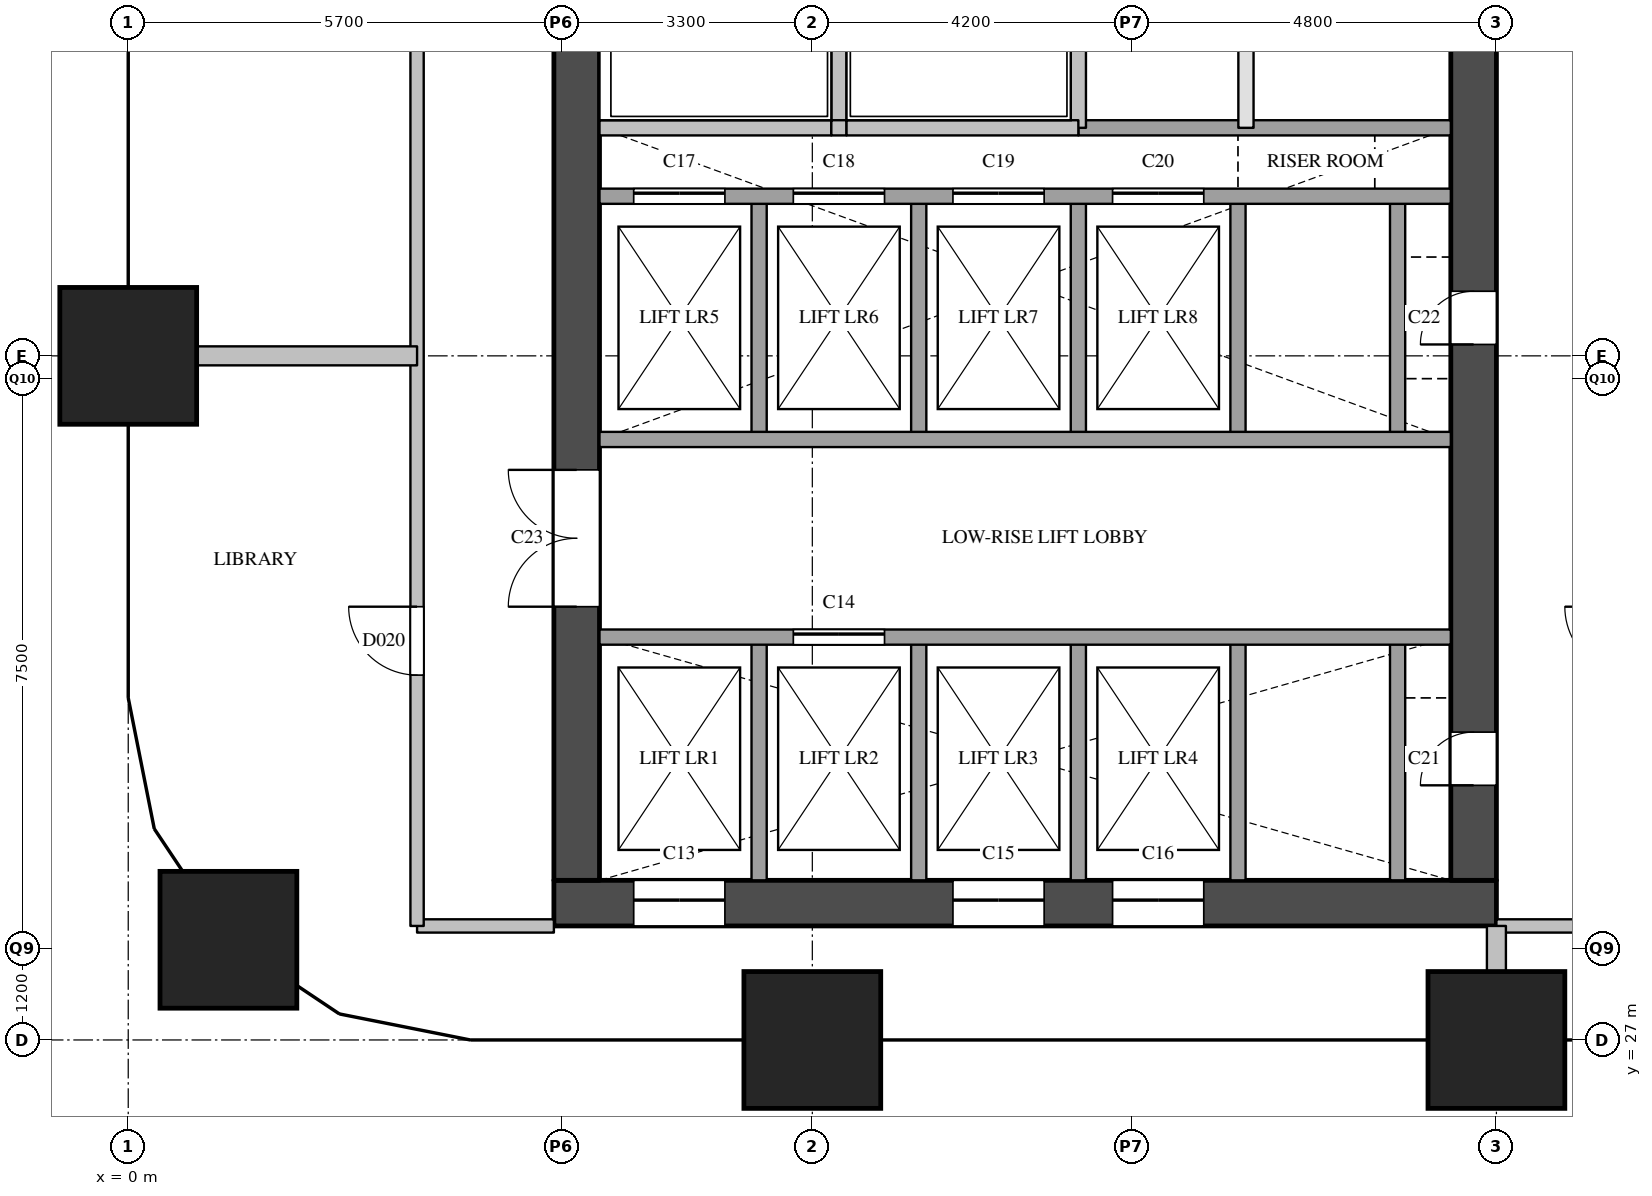
"""IFC4 building model, lengths in metres.
Left out: names, types, materials, properties, quantities, classifications, styles, units other than length and angle.
Written with IfcOpenShell. Run it as: python <this file> out.ifc"""

import sys

from ifc_helpers import new_model, si_unit, direction, frame, frame_2d, origin, origin_2d, place, context, subcontext, project, spatial, rectangle, extrude, element, fill, save


model = new_model("IFC4")
c1 = context("Model", 3, precision=1e-05, world=origin(), true_north=direction((0.0, 1.0)))
c2 = subcontext(c1, "Body", "Model", "MODEL_VIEW")
j1 = project(units=[si_unit("LENGTHUNIT", "METRE"), si_unit("PLANEANGLEUNIT", "RADIAN")], contexts=[c1])
p1 = place(None, origin())
s1 = spatial("IfcSite", under=j1, at=p1, CompositionType="ELEMENT")
p2 = place(p1, origin())
s2 = spatial("IfcBuilding", under=s1, at=p2, CompositionType="ELEMENT")
p3 = place(p2, frame((0.0, 0.0, 96.8)))
s3 = spatial("IfcBuildingStorey", under=s2, at=p3, CompositionType="ELEMENT", Elevation=96.8)
for number, where, z_axis, x_axis in (
    (1, (1.318, 28.318, 0.0), (0.0, 0.0, 1.0), (1.0, 0.0, 0.0)),
    (2, (0.0, 36.0, 0.0), (0.0, 0.0, 1.0), (1.0, 0.0, 0.0)),
    (3, (9.0, 27.0, 0.0), (0.0, 0.0, 1.0), (1.0, 0.0, 0.0)),
    (4, (18.0, 27.0, 0.0), (0.0, 0.0, 1.0), (1.0, 0.0, 0.0)),
):
    element("IfcColumn", number, at=place(p3, frame(where, z_axis=z_axis, x_axis=x_axis)), inside=s3, PredefinedType="COLUMN", context=c2, shape_type="SweptSolid", body=[
        extrude(rectangle(XDim=1.8, YDim=1.8, at=origin_2d()), origin(), (0.0, 0.0, 1.0), 3.8),
    ])
p4 = place(p3, frame((5.6, 28.8, 0.0), z_axis=(0.0, 0.0, 1.0), x_axis=(1.0, 0.0, 0.0)))
e5 = element("IfcWall", 5, at=p4, inside=s3, PredefinedType="SHEAR", context=c2, shape_type="SweptSolid", body=[
    extrude(rectangle(XDim=12.4, YDim=0.6, at=frame_2d((6.2, 0.0))), origin(), (0.0, 0.0, 1.0), 3.5),
])
p5 = place(p4, frame((1.05, 0.0, 0.0)))
e6 = element("IfcOpeningElement", 6, at=p5, cuts=e5, PredefinedType="OPENING", context=c2, shape_type="SweptSolid", body=[
    extrude(rectangle(XDim=1.2, YDim=2.1, at=frame_2d((0.6, 1.05))), frame((0.0, 0.31, 0.0), z_axis=(0.0, -1.0, 0.0), x_axis=(1.0, 0.0, 0.0)), (0.0, 0.0, 1.0), 0.62),
])
p6 = place(p4, frame((5.25, 0.0, 0.0)))
e7 = element("IfcOpeningElement", 7, at=p6, cuts=e5, PredefinedType="OPENING", context=c2, shape_type="SweptSolid", body=[
    extrude(rectangle(XDim=1.2, YDim=2.1, at=frame_2d((0.6, 1.05))), frame((0.0, 0.31, 0.0), z_axis=(0.0, -1.0, 0.0), x_axis=(1.0, 0.0, 0.0)), (0.0, 0.0, 1.0), 0.62),
])
p7 = place(p4, frame((7.35, 0.0, 0.0)))
e8 = element("IfcOpeningElement", 8, at=p7, cuts=e5, PredefinedType="OPENING", context=c2, shape_type="SweptSolid", body=[
    extrude(rectangle(XDim=1.2, YDim=2.1, at=frame_2d((0.6, 1.05))), frame((0.0, 0.31, 0.0), z_axis=(0.0, -1.0, 0.0), x_axis=(1.0, 0.0, 0.0)), (0.0, 0.0, 1.0), 0.62),
])
p8 = place(p3, frame((5.9, 29.1, 0.0), z_axis=(0.0, 0.0, 1.0), x_axis=(0.0, 1.0, 0.0)))
e9 = element("IfcWall", 9, at=p8, inside=s3, PredefinedType="SHEAR", context=c2, shape_type="SweptSolid", body=[
    extrude(rectangle(XDim=20.3, YDim=0.6, at=frame_2d((10.15, 0.0))), origin(), (0.0, 0.0, 1.0), 3.5),
])
p9 = place(p8, frame((3.6, 0.0, 0.0)))
e10 = element("IfcOpeningElement", 10, at=p9, cuts=e9, PredefinedType="OPENING", context=c2, shape_type="SweptSolid", body=[
    extrude(rectangle(XDim=1.8, YDim=2.1, at=frame_2d((0.9, 1.05))), frame((0.0, 0.31, 0.0), z_axis=(0.0, -1.0, 0.0), x_axis=(1.0, 0.0, 0.0)), (0.0, 0.0, 1.0), 0.62),
])
p10 = place(p8, frame((16.4, 0.0, 0.0)))
e11 = element("IfcOpeningElement", 11, at=p10, cuts=e9, PredefinedType="OPENING", context=c2, shape_type="SweptSolid", body=[
    extrude(rectangle(XDim=1.0, YDim=2.1, at=frame_2d((0.5, 1.05))), frame((0.0, 0.31, 0.0), z_axis=(0.0, -1.0, 0.0), x_axis=(1.0, 0.0, 0.0)), (0.0, 0.0, 1.0), 0.62),
])
p11 = place(p3, frame((17.7, 29.1, 0.0), z_axis=(0.0, 0.0, 1.0), x_axis=(0.0, 1.0, 0.0)))
e12 = element("IfcWall", 12, at=p11, inside=s3, PredefinedType="SHEAR", context=c2, shape_type="SweptSolid", body=[
    extrude(rectangle(XDim=20.3, YDim=0.6, at=frame_2d((10.15, 0.0))), origin(), (0.0, 0.0, 1.0), 3.5),
])
p12 = place(p11, frame((1.25, 0.0, 0.0)))
e13 = element("IfcOpeningElement", 13, at=p12, cuts=e12, PredefinedType="OPENING", context=c2, shape_type="SweptSolid", body=[
    extrude(rectangle(XDim=0.7, YDim=2.1, at=frame_2d((0.35, 1.05))), frame((0.0, 0.31, 0.0), z_axis=(0.0, -1.0, 0.0), x_axis=(1.0, 0.0, 0.0)), (0.0, 0.0, 1.0), 0.62),
])
p13 = place(p11, frame((7.05, 0.0, 0.0)))
e14 = element("IfcOpeningElement", 14, at=p13, cuts=e12, PredefinedType="OPENING", context=c2, shape_type="SweptSolid", body=[
    extrude(rectangle(XDim=0.7, YDim=2.1, at=frame_2d((0.35, 1.05))), frame((0.0, 0.31, 0.0), z_axis=(0.0, -1.0, 0.0), x_axis=(1.0, 0.0, 0.0)), (0.0, 0.0, 1.0), 0.62),
])
p14 = place(p3, frame((8.3, 29.1, 0.0), z_axis=(0.0, 0.0, 1.0), x_axis=(0.0, 1.0, 0.0)))
e15 = element("IfcWall", 15, at=p14, inside=s3, PredefinedType="SOLIDWALL", context=c2, shape_type="SweptSolid", body=[
    extrude(rectangle(XDim=3.2, YDim=0.2, at=frame_2d((1.6, 0.0))), origin(), (0.0, 0.0, 1.0), 3.5),
])
p15 = place(p3, frame((8.3, 34.9, 0.0), z_axis=(0.0, 0.0, 1.0), x_axis=(0.0, 1.0, 0.0)))
e16 = element("IfcWall", 16, at=p15, inside=s3, PredefinedType="SOLIDWALL", context=c2, shape_type="SweptSolid", body=[
    extrude(rectangle(XDim=3.2, YDim=0.2, at=frame_2d((1.6, 0.0))), origin(), (0.0, 0.0, 1.0), 3.5),
])
p16 = place(p3, frame((9.35, 39.0, 0.0), z_axis=(0.0, 0.0, 1.0), x_axis=(0.0, 1.0, 0.0)))
e17 = element("IfcWall", 17, at=p16, inside=s3, PredefinedType="SOLIDWALL", context=c2, shape_type="SweptSolid", body=[
    extrude(rectangle(XDim=1.9, YDim=0.2, at=frame_2d((0.95, 0.0))), origin(), (0.0, 0.0, 1.0), 3.5),
])
p17 = place(p3, frame((10.4, 29.1, 0.0), z_axis=(0.0, 0.0, 1.0), x_axis=(0.0, 1.0, 0.0)))
e18 = element("IfcWall", 18, at=p17, inside=s3, PredefinedType="SOLIDWALL", context=c2, shape_type="SweptSolid", body=[
    extrude(rectangle(XDim=3.2, YDim=0.2, at=frame_2d((1.6, 0.0))), origin(), (0.0, 0.0, 1.0), 3.5),
])
p18 = place(p3, frame((10.4, 34.9, 0.0), z_axis=(0.0, 0.0, 1.0), x_axis=(0.0, 1.0, 0.0)))
e19 = element("IfcWall", 19, at=p18, inside=s3, PredefinedType="SOLIDWALL", context=c2, shape_type="SweptSolid", body=[
    extrude(rectangle(XDim=3.2, YDim=0.2, at=frame_2d((1.6, 0.0))), origin(), (0.0, 0.0, 1.0), 3.5),
])
p19 = place(p3, frame((12.5, 29.1, 0.0), z_axis=(0.0, 0.0, 1.0), x_axis=(0.0, 1.0, 0.0)))
e20 = element("IfcWall", 20, at=p19, inside=s3, PredefinedType="SOLIDWALL", context=c2, shape_type="SweptSolid", body=[
    extrude(rectangle(XDim=3.2, YDim=0.2, at=frame_2d((1.6, 0.0))), origin(), (0.0, 0.0, 1.0), 3.5),
])
p20 = place(p3, frame((12.5, 34.9, 0.0), z_axis=(0.0, 0.0, 1.0), x_axis=(0.0, 1.0, 0.0)))
e21 = element("IfcWall", 21, at=p20, inside=s3, PredefinedType="SOLIDWALL", context=c2, shape_type="SweptSolid", body=[
    extrude(rectangle(XDim=3.2, YDim=0.2, at=frame_2d((1.6, 0.0))), origin(), (0.0, 0.0, 1.0), 3.5),
])
p21 = place(p3, frame((12.5, 39.0, 0.0), z_axis=(0.0, 0.0, 1.0), x_axis=(0.0, 1.0, 0.0)))
e22 = element("IfcWall", 22, at=p21, inside=s3, PredefinedType="SOLIDWALL", context=c2, shape_type="SweptSolid", body=[
    extrude(rectangle(XDim=1.9, YDim=0.2, at=frame_2d((0.95, 0.0))), origin(), (0.0, 0.0, 1.0), 3.5),
])
p22 = place(p3, frame((14.6, 29.1, 0.0), z_axis=(0.0, 0.0, 1.0), x_axis=(0.0, 1.0, 0.0)))
e23 = element("IfcWall", 23, at=p22, inside=s3, PredefinedType="SOLIDWALL", context=c2, shape_type="SweptSolid", body=[
    extrude(rectangle(XDim=3.2, YDim=0.2, at=frame_2d((1.6, 0.0))), origin(), (0.0, 0.0, 1.0), 3.5),
])
p23 = place(p3, frame((14.6, 34.9, 0.0), z_axis=(0.0, 0.0, 1.0), x_axis=(0.0, 1.0, 0.0)))
e24 = element("IfcWall", 24, at=p23, inside=s3, PredefinedType="SOLIDWALL", context=c2, shape_type="SweptSolid", body=[
    extrude(rectangle(XDim=3.2, YDim=0.2, at=frame_2d((1.6, 0.0))), origin(), (0.0, 0.0, 1.0), 3.5),
])
p24 = place(p3, frame((14.705, 39.0, 0.0), z_axis=(0.0, 0.0, 1.0), x_axis=(0.0, 1.0, 0.0)))
e25 = element("IfcWall", 25, at=p24, inside=s3, PredefinedType="PARTITIONING", context=c2, shape_type="SweptSolid", body=[
    extrude(rectangle(XDim=6.2, YDim=0.2, at=frame_2d((3.1, 0.0))), origin(), (0.0, 0.0, 1.0), 3.5),
])
p25 = place(p3, frame((16.7, 29.1, 0.0), z_axis=(0.0, 0.0, 1.0), x_axis=(0.0, 1.0, 0.0)))
e26 = element("IfcWall", 26, at=p25, inside=s3, PredefinedType="SOLIDWALL", context=c2, shape_type="SweptSolid", body=[
    extrude(rectangle(XDim=3.2, YDim=0.2, at=frame_2d((1.6, 0.0))), origin(), (0.0, 0.0, 1.0), 3.5),
])
p26 = place(p3, frame((16.7, 34.9, 0.0), z_axis=(0.0, 0.0, 1.0), x_axis=(0.0, 1.0, 0.0)))
e27 = element("IfcWall", 27, at=p26, inside=s3, PredefinedType="SOLIDWALL", context=c2, shape_type="SweptSolid", body=[
    extrude(rectangle(XDim=3.2, YDim=0.2, at=frame_2d((1.6, 0.0))), origin(), (0.0, 0.0, 1.0), 3.5),
])
p27 = place(p3, frame((6.2, 32.3, 0.0), z_axis=(0.0, 0.0, 1.0), x_axis=(1.0, 0.0, 0.0)))
e28 = element("IfcWall", 28, at=p27, inside=s3, PredefinedType="SOLIDWALL", context=c2, shape_type="SweptSolid", body=[
    extrude(rectangle(XDim=11.2, YDim=0.2, at=frame_2d((5.6, 0.0))), origin(), (0.0, 0.0, 1.0), 3.5),
])
p28 = place(p27, frame((2.55, 0.0, 0.0)))
e29 = element("IfcOpeningElement", 29, at=p28, cuts=e28, PredefinedType="OPENING", context=c2, shape_type="SweptSolid", body=[
    extrude(rectangle(XDim=1.2, YDim=2.1, at=frame_2d((0.6, 1.05))), frame((0.0, 0.11, 0.0), z_axis=(0.0, -1.0, 0.0), x_axis=(1.0, 0.0, 0.0)), (0.0, 0.0, 1.0), 0.22),
])
p29 = place(p3, frame((6.2, 34.9, 0.0), z_axis=(0.0, 0.0, 1.0), x_axis=(1.0, 0.0, 0.0)))
e30 = element("IfcWall", 30, at=p29, inside=s3, PredefinedType="SOLIDWALL", context=c2, shape_type="SweptSolid", body=[
    extrude(rectangle(XDim=11.2, YDim=0.2, at=frame_2d((5.6, 0.0))), origin(), (0.0, 0.0, 1.0), 3.5),
])
p30 = place(p3, frame((6.2, 38.1, 0.0), z_axis=(0.0, 0.0, 1.0), x_axis=(1.0, 0.0, 0.0)))
e31 = element("IfcWall", 31, at=p30, inside=s3, PredefinedType="SOLIDWALL", context=c2, shape_type="SweptSolid", body=[
    extrude(rectangle(XDim=11.2, YDim=0.2, at=frame_2d((5.6, 0.0))), origin(), (0.0, 0.0, 1.0), 3.5),
])
p31 = place(p30, frame((0.45, 0.0, 0.0)))
e32 = element("IfcOpeningElement", 32, at=p31, cuts=e31, PredefinedType="OPENING", context=c2, shape_type="SweptSolid", body=[
    extrude(rectangle(XDim=1.2, YDim=2.1, at=frame_2d((0.6, 1.05))), frame((0.0, 0.11, 0.0), z_axis=(0.0, -1.0, 0.0), x_axis=(1.0, 0.0, 0.0)), (0.0, 0.0, 1.0), 0.22),
])
p32 = place(p30, frame((2.55, 0.0, 0.0)))
e33 = element("IfcOpeningElement", 33, at=p32, cuts=e31, PredefinedType="OPENING", context=c2, shape_type="SweptSolid", body=[
    extrude(rectangle(XDim=1.2, YDim=2.1, at=frame_2d((0.6, 1.05))), frame((0.0, 0.11, 0.0), z_axis=(0.0, -1.0, 0.0), x_axis=(1.0, 0.0, 0.0)), (0.0, 0.0, 1.0), 0.22),
])
p33 = place(p30, frame((4.65, 0.0, 0.0)))
e34 = element("IfcOpeningElement", 34, at=p33, cuts=e31, PredefinedType="OPENING", context=c2, shape_type="SweptSolid", body=[
    extrude(rectangle(XDim=1.2, YDim=2.1, at=frame_2d((0.6, 1.05))), frame((0.0, 0.11, 0.0), z_axis=(0.0, -1.0, 0.0), x_axis=(1.0, 0.0, 0.0)), (0.0, 0.0, 1.0), 0.22),
])
p34 = place(p30, frame((6.75, 0.0, 0.0)))
e35 = element("IfcOpeningElement", 35, at=p34, cuts=e31, PredefinedType="OPENING", context=c2, shape_type="SweptSolid", body=[
    extrude(rectangle(XDim=1.2, YDim=2.1, at=frame_2d((0.6, 1.05))), frame((0.0, 0.11, 0.0), z_axis=(0.0, -1.0, 0.0), x_axis=(1.0, 0.0, 0.0)), (0.0, 0.0, 1.0), 0.22),
])
p35 = place(p3, frame((12.5, 39.0, 0.0), z_axis=(0.0, 0.0, 1.0), x_axis=(1.0, 0.0, 0.0)))
e36 = element("IfcWall", 36, at=p35, inside=s3, PredefinedType="SOLIDWALL", context=c2, shape_type="SweptSolid", body=[
    extrude(rectangle(XDim=4.9, YDim=0.2, at=frame_2d((2.45, 0.0))), origin(), (0.0, 0.0, 1.0), 3.5),
])
p36 = place(p3, frame((6.2, 39.0, 0.0), z_axis=(0.0, 0.0, 1.0), x_axis=(1.0, 0.0, 0.0)))
e37 = element("IfcWall", 37, at=p36, inside=s3, PredefinedType="SOLIDWALL", context=c2, shape_type="SweptSolid", body=[
    extrude(rectangle(XDim=3.05, YDim=0.2, at=frame_2d((1.525, 0.0))), origin(), (0.0, 0.0, 1.0), 3.5),
])
p37 = place(p3, frame((9.25, 39.0, 0.0), z_axis=(0.0, 0.0, 1.0), x_axis=(1.0, 0.0, 0.0)))
e38 = element("IfcWall", 38, at=p37, inside=s3, PredefinedType="SOLIDWALL", context=c2, shape_type="SweptSolid", body=[
    extrude(rectangle(XDim=0.2, YDim=0.2, at=frame_2d((0.1, 0.0))), origin(), (0.0, 0.0, 1.0), 3.5),
])
p38 = place(p3, frame((9.45, 39.0, 0.0), z_axis=(0.0, 0.0, 1.0), x_axis=(1.0, 0.0, 0.0)))
e39 = element("IfcWall", 39, at=p38, inside=s3, PredefinedType="SOLIDWALL", context=c2, shape_type="SweptSolid", body=[
    extrude(rectangle(XDim=3.05, YDim=0.2, at=frame_2d((1.525, 0.0))), origin(), (0.0, 0.0, 1.0), 3.5),
])
for number, where, z_axis, x_axis in (
    (40, (3.8, 28.5, 0.0), (0.0, 0.0, 1.0), (1.0, 0.0, 0.0)),
    (41, (18.0, 28.5, 0.0), (0.0, 0.0, 1.0), (1.0, 0.0, 0.0)),
):
    element("IfcWall", number, at=place(p3, frame(where, z_axis=z_axis, x_axis=x_axis)), inside=s3, PredefinedType="PARTITIONING", context=c2, shape_type="SweptSolid", body=[
        extrude(rectangle(XDim=1.8, YDim=0.175, at=frame_2d((0.9, 0.0))), origin(), (0.0, 0.0, 1.0), 3.5),
    ])
p39 = place(p3, frame((3.8, 28.5, 0.0), z_axis=(0.0, 0.0, 1.0), x_axis=(0.0, 1.0, 0.0)))
e42 = element("IfcWall", 42, at=p39, inside=s3, PredefinedType="PARTITIONING", context=c2, shape_type="SweptSolid", body=[
    extrude(rectangle(XDim=23.3, YDim=0.175, at=frame_2d((11.65, 0.0))), origin(), (0.0, 0.0, 1.0), 3.5),
])
p40 = place(p39, frame((3.3, 0.0, 0.0)))
e43 = element("IfcOpeningElement", 43, at=p40, cuts=e42, PredefinedType="OPENING", context=c2, shape_type="SweptSolid", body=[
    extrude(rectangle(XDim=0.9, YDim=2.1, at=frame_2d((0.45, 1.05))), frame((0.0, 0.097, 0.0), z_axis=(0.0, -1.0, 0.0), x_axis=(1.0, 0.0, 0.0)), (0.0, 0.0, 1.0), 0.195),
])
p41 = place(p39, frame((11.55, 0.0, 0.0)))
e44 = element("IfcOpeningElement", 44, at=p41, cuts=e42, PredefinedType="OPENING", context=c2, shape_type="SweptSolid", body=[
    extrude(rectangle(XDim=0.9, YDim=2.1, at=frame_2d((0.45, 1.05))), frame((0.0, 0.097, 0.0), z_axis=(0.0, -1.0, 0.0), x_axis=(1.0, 0.0, 0.0)), (0.0, 0.0, 1.0), 0.195),
])
p42 = place(p39, frame((19.45, 0.0, 0.0)))
e45 = element("IfcOpeningElement", 45, at=p42, cuts=e42, PredefinedType="OPENING", context=c2, shape_type="SweptSolid", body=[
    extrude(rectangle(XDim=0.9, YDim=2.1, at=frame_2d((0.45, 1.05))), frame((0.0, 0.097, 0.0), z_axis=(0.0, -1.0, 0.0), x_axis=(1.0, 0.0, 0.0)), (0.0, 0.0, 1.0), 0.195),
])
p43 = place(p3, frame((0.0, 36.0, 0.0), z_axis=(0.0, 0.0, 1.0), x_axis=(1.0, 0.0, 0.0)))
e46 = element("IfcWall", 46, at=p43, inside=s3, PredefinedType="PARTITIONING", context=c2, shape_type="SweptSolid", body=[
    extrude(rectangle(XDim=3.8, YDim=0.25, at=frame_2d((1.9, 0.0))), origin(), (0.0, 0.0, 1.0), 3.5),
])
p44 = place(p3, frame((18.0, 27.0, 0.0), z_axis=(0.0, 0.0, 1.0), x_axis=(0.0, 1.0, 0.0)))
e47 = element("IfcWall", 47, at=p44, inside=s3, PredefinedType="PARTITIONING", context=c2, shape_type="SweptSolid", body=[
    extrude(rectangle(XDim=1.5, YDim=0.25, at=frame_2d((0.75, 0.0))), origin(), (0.0, 0.0, 1.0), 3.5),
])
p45 = place(p5, origin())
e48 = element("IfcDoor", 48, at=p45, inside=s3, OperationType="SLIDING_TO_LEFT", PredefinedType="DOOR", context=c2, shape_type="SweptSolid", body=[
    extrude(rectangle(XDim=1.2, YDim=2.1, at=frame_2d((0.6, 1.05))), frame((0.0, 0.025, 0.0), z_axis=(0.0, -1.0, 0.0), x_axis=(1.0, 0.0, 0.0)), (0.0, 0.0, 1.0), 0.05),
])
fill(e6, e48)
p46 = place(p28, origin())
e49 = element("IfcDoor", 49, at=p46, inside=s3, OperationType="SLIDING_TO_LEFT", PredefinedType="DOOR", context=c2, shape_type="SweptSolid", body=[
    extrude(rectangle(XDim=1.2, YDim=2.1, at=frame_2d((0.6, 1.05))), frame((0.0, 0.025, 0.0), z_axis=(0.0, -1.0, 0.0), x_axis=(1.0, 0.0, 0.0)), (0.0, 0.0, 1.0), 0.05),
])
fill(e29, e49)
p47 = place(p6, origin())
e50 = element("IfcDoor", 50, at=p47, inside=s3, OperationType="SLIDING_TO_LEFT", PredefinedType="DOOR", context=c2, shape_type="SweptSolid", body=[
    extrude(rectangle(XDim=1.2, YDim=2.1, at=frame_2d((0.6, 1.05))), frame((0.0, 0.025, 0.0), z_axis=(0.0, -1.0, 0.0), x_axis=(1.0, 0.0, 0.0)), (0.0, 0.0, 1.0), 0.05),
])
fill(e7, e50)
p48 = place(p7, origin())
e51 = element("IfcDoor", 51, at=p48, inside=s3, OperationType="SLIDING_TO_LEFT", PredefinedType="DOOR", context=c2, shape_type="SweptSolid", body=[
    extrude(rectangle(XDim=1.2, YDim=2.1, at=frame_2d((0.6, 1.05))), frame((0.0, 0.025, 0.0), z_axis=(0.0, -1.0, 0.0), x_axis=(1.0, 0.0, 0.0)), (0.0, 0.0, 1.0), 0.05),
])
fill(e8, e51)
p49 = place(p31, origin())
e52 = element("IfcDoor", 52, at=p49, inside=s3, OperationType="SLIDING_TO_LEFT", PredefinedType="DOOR", context=c2, shape_type="SweptSolid", body=[
    extrude(rectangle(XDim=1.2, YDim=2.1, at=frame_2d((0.6, 1.05))), frame((0.0, 0.025, 0.0), z_axis=(0.0, -1.0, 0.0), x_axis=(1.0, 0.0, 0.0)), (0.0, 0.0, 1.0), 0.05),
])
fill(e32, e52)
p50 = place(p32, origin())
e53 = element("IfcDoor", 53, at=p50, inside=s3, OperationType="SLIDING_TO_LEFT", PredefinedType="DOOR", context=c2, shape_type="SweptSolid", body=[
    extrude(rectangle(XDim=1.2, YDim=2.1, at=frame_2d((0.6, 1.05))), frame((0.0, 0.025, 0.0), z_axis=(0.0, -1.0, 0.0), x_axis=(1.0, 0.0, 0.0)), (0.0, 0.0, 1.0), 0.05),
])
fill(e33, e53)
p51 = place(p33, origin())
e54 = element("IfcDoor", 54, at=p51, inside=s3, OperationType="SLIDING_TO_LEFT", PredefinedType="DOOR", context=c2, shape_type="SweptSolid", body=[
    extrude(rectangle(XDim=1.2, YDim=2.1, at=frame_2d((0.6, 1.05))), frame((0.0, 0.025, 0.0), z_axis=(0.0, -1.0, 0.0), x_axis=(1.0, 0.0, 0.0)), (0.0, 0.0, 1.0), 0.05),
])
fill(e34, e54)
p52 = place(p34, origin())
e55 = element("IfcDoor", 55, at=p52, inside=s3, OperationType="SLIDING_TO_LEFT", PredefinedType="DOOR", context=c2, shape_type="SweptSolid", body=[
    extrude(rectangle(XDim=1.2, YDim=2.1, at=frame_2d((0.6, 1.05))), frame((0.0, 0.025, 0.0), z_axis=(0.0, -1.0, 0.0), x_axis=(1.0, 0.0, 0.0)), (0.0, 0.0, 1.0), 0.05),
])
fill(e35, e55)
p53 = place(p12, origin())
e56 = element("IfcDoor", 56, at=p53, inside=s3, OperationType="SINGLE_SWING_LEFT", PredefinedType="DOOR", context=c2, shape_type="SweptSolid", body=[
    extrude(rectangle(XDim=0.7, YDim=2.1, at=frame_2d((0.35, 1.05))), frame((0.0, 0.025, 0.0), z_axis=(0.0, -1.0, 0.0), x_axis=(1.0, 0.0, 0.0)), (0.0, 0.0, 1.0), 0.05),
])
fill(e13, e56)
p54 = place(p13, origin())
e57 = element("IfcDoor", 57, at=p54, inside=s3, OperationType="SINGLE_SWING_LEFT", PredefinedType="DOOR", context=c2, shape_type="SweptSolid", body=[
    extrude(rectangle(XDim=0.7, YDim=2.1, at=frame_2d((0.35, 1.05))), frame((0.0, 0.025, 0.0), z_axis=(0.0, -1.0, 0.0), x_axis=(1.0, 0.0, 0.0)), (0.0, 0.0, 1.0), 0.05),
])
fill(e14, e57)
p55 = place(p9, origin())
e58 = element("IfcDoor", 58, at=p55, inside=s3, OperationType="DOUBLE_DOOR_SINGLE_SWING", PredefinedType="DOOR", context=c2, shape_type="SweptSolid", body=[
    extrude(rectangle(XDim=1.8, YDim=2.1, at=frame_2d((0.9, 1.05))), frame((0.0, 0.025, 0.0), z_axis=(0.0, -1.0, 0.0), x_axis=(1.0, 0.0, 0.0)), (0.0, 0.0, 1.0), 0.05),
])
fill(e10, e58)
p56 = place(p40, origin())
e59 = element("IfcDoor", 59, at=p56, inside=s3, OperationType="SINGLE_SWING_RIGHT", PredefinedType="DOOR", context=c2, shape_type="SweptSolid", body=[
    extrude(rectangle(XDim=0.9, YDim=2.1, at=frame_2d((0.45, 1.05))), frame((0.0, 0.025, 0.0), z_axis=(0.0, -1.0, 0.0), x_axis=(1.0, 0.0, 0.0)), (0.0, 0.0, 1.0), 0.05),
])
fill(e43, e59)
save(model, sys.argv[1])
